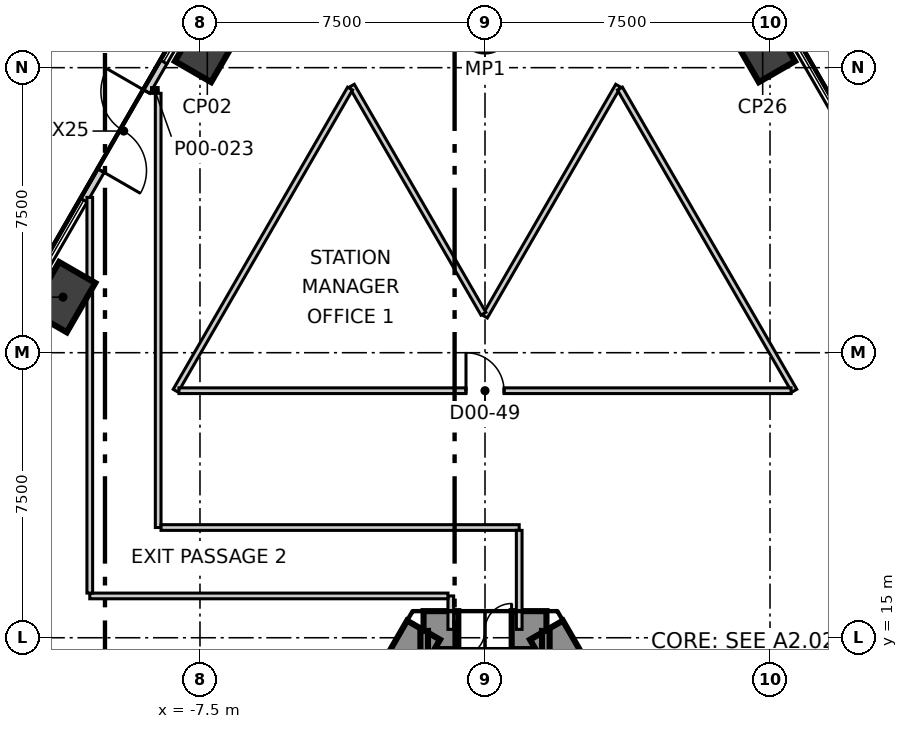
"""IFC4 building model, lengths in metres.
Left out: names, types, materials, properties, quantities, classifications, styles, units other than length and angle.
Written with IfcOpenShell. Run it as: python <this file> out.ifc"""

import sys

from ifc_helpers import new_model, si_unit, direction, frame, frame_2d, origin, origin_2d, place, context, subcontext, project, spatial, polyline, rectangle, outline, extrude, element, fill, save


model = new_model("IFC4")
c1 = context("Model", 3, precision=1e-05, world=origin(), true_north=direction((0.0, 1.0)))
c2 = subcontext(c1, "Body", "Model", "MODEL_VIEW")
j1 = project(units=[si_unit("LENGTHUNIT", "METRE"), si_unit("PLANEANGLEUNIT", "RADIAN")], contexts=[c1])
p1 = place(None, origin())
s1 = spatial("IfcSite", under=j1, at=p1, CompositionType="ELEMENT")
p2 = place(p1, origin())
s2 = spatial("IfcBuilding", under=s1, at=p2, CompositionType="ELEMENT")
p3 = place(p2, origin())
s3 = spatial("IfcBuildingStorey", under=s2, at=p3, CompositionType="ELEMENT", Elevation=0.0)
p4 = place(p3, frame((1.617, 15.2, -0.4), z_axis=(0.0, 0.0, 1.0), x_axis=(-1.0, 0.0, 0.0)))
e1 = element("IfcWall", 1, at=p4, inside=s3, PredefinedType="SHEAR", context=c2, shape_type="SweptSolid", body=[
    extrude(outline(polyline([(-0.288, -0.5), (1.617, -0.5), (3.522, -0.5), (2.945, 0.5), (1.617, 0.5), (0.289, 0.5), (-0.288, -0.5)])), origin(), (0.0, 0.0, 1.0), 8.5),
])
p5 = place(p4, frame((0.917, 0.0, 0.4)))
e2 = element("IfcOpeningElement", 2, at=p5, cuts=e1, PredefinedType="OPENING", context=c2, shape_type="SweptSolid", body=[
    extrude(rectangle(XDim=1.4, YDim=2.1, at=frame_2d((0.7, 1.05))), frame((0.0, 0.51, 0.0), z_axis=(0.0, -1.0, 0.0), x_axis=(1.0, 0.0, 0.0)), (0.0, 0.0, 1.0), 1.02),
])
p6 = place(p3, frame((-1.617, 15.2, -0.4), z_axis=(0.0, 0.0, 1.0), x_axis=(-0.499992141631, -0.866029940768, 0.0)))
e3 = element("IfcWall", 3, at=p6, inside=s3, PredefinedType="SHEAR", context=c2, shape_type="SweptSolid", body=[
    extrude(outline(polyline([(-0.289, -0.499), (1.656, -0.499), (3.601, -0.499), (5.547, -0.499), (7.492, -0.499), (9.437, -0.5), (11.382, -0.5), (13.328, -0.5), (15.273, -0.5), (17.218, -0.5), (19.163, -0.5), (21.109, -0.5), (23.054, -0.5), (24.999, -0.5), (24.422, 0.5), (22.566, 0.5), (20.709, 0.5), (18.853, 0.5), (16.997, 0.5), (15.14, 0.5), (13.284, 0.5), (11.427, 0.5), (9.571, 0.5), (7.715, 0.5), (5.858, 0.5), (4.002, 0.5), (2.146, 0.5), (0.289, 0.5), (-0.289, -0.499)])), origin(), (0.0, 0.0, 1.0), 8.5),
])
p7 = place(p6, frame((11.805, 0.0, 0.4)))
e4 = element("IfcOpeningElement", 4, at=p7, cuts=e3, PredefinedType="OPENING", context=c2, shape_type="SweptSolid", body=[
    extrude(rectangle(XDim=1.1, YDim=2.1, at=frame_2d((0.55, 1.05))), frame((0.0, 0.51, 0.0), z_axis=(0.0, -1.0, 0.0), x_axis=(1.0, 0.0, 0.0)), (0.0, 0.0, 1.0), 1.02),
])
p8 = place(p3, frame((13.972, -6.2, -0.4), z_axis=(0.0, 0.0, 1.0), x_axis=(-0.499992141631, 0.866029940768, 0.0)))
e5 = element("IfcWall", 5, at=p8, inside=s3, PredefinedType="SHEAR", context=c2, shape_type="SweptSolid", body=[
    extrude(outline(polyline([(-0.288, -0.5), (1.657, -0.5), (3.602, -0.5), (5.547, -0.5), (7.493, -0.5), (9.438, -0.5), (11.383, -0.5), (13.328, -0.5), (15.273, -0.5), (17.218, -0.499), (19.164, -0.499), (21.109, -0.499), (23.054, -0.499), (24.999, -0.499), (24.422, 0.5), (22.566, 0.5), (20.709, 0.5), (18.853, 0.5), (16.996, 0.5), (15.14, 0.5), (13.283, 0.5), (11.427, 0.5), (9.57, 0.5), (7.714, 0.5), (5.857, 0.5), (4.001, 0.5), (2.145, 0.5), (0.288, 0.5), (-0.288, -0.5)])), origin(), (0.0, 0.0, 1.0), 8.5),
])
p9 = place(p8, frame((11.455, 0.0, 0.4)))
e6 = element("IfcOpeningElement", 6, at=p9, cuts=e5, PredefinedType="OPENING", context=c2, shape_type="SweptSolid", body=[
    extrude(rectangle(XDim=1.8, YDim=2.1, at=frame_2d((0.9, 1.05))), frame((0.0, 0.51, 0.0), z_axis=(0.0, -1.0, 0.0), x_axis=(1.0, 0.0, 0.0)), (0.0, 0.0, 1.0), 1.02),
])
for number, where, z_axis, x_axis in (
    (7, (-7.307, 30.544, -0.4), (0.0, 0.0, 1.0), (0.5, 0.866, 0.0)),
    (8, (-11.106, 23.962, -0.4), (0.0, 0.0, 1.0), (0.5, 0.866, 0.0)),
    (9, (7.307, 30.544, -0.4), (0.0, 0.0, 1.0), (-0.5, 0.866, 0.0)),
):
    element("IfcColumn", number, at=place(p3, frame(where, z_axis=z_axis, x_axis=x_axis)), inside=s3, PredefinedType="COLUMN", context=c2, shape_type="SweptSolid", body=[
        extrude(rectangle(XDim=1.5, YDim=1.1, at=origin_2d()), origin(), (0.0, 0.0, 1.0), 8.5),
    ])
p10 = place(p3, frame((-8.457, 30.151, 0.0), z_axis=(0.0, 0.0, 1.0), x_axis=(-0.500009288593, -0.866020040946, 0.0)))
e10 = element("IfcWall", 10, at=p10, inside=s3, PredefinedType="ELEMENTEDWALL", context=c2, shape_type="SweptSolid", body=[
    extrude(rectangle(XDim=4.2, YDim=0.2, at=frame_2d((2.1, 0.0))), origin(), (0.0, 0.0, 1.0), 8.1),
])
p11 = place(p10, frame((0.9, 0.0, 0.0)))
e11 = element("IfcOpeningElement", 11, at=p11, cuts=e10, PredefinedType="OPENING", context=c2, shape_type="SweptSolid", body=[
    extrude(rectangle(XDim=2.4, YDim=3.2, at=frame_2d((1.2, 1.6))), frame((0.0, 0.11, 0.0), z_axis=(0.0, -1.0, 0.0), x_axis=(1.0, 0.0, 0.0)), (0.0, 0.0, 1.0), 0.22),
])
p12 = place(p3, frame((-0.9, 15.22, 0.0), z_axis=(0.0, 0.0, 1.0), x_axis=(0.0, 1.0, 0.0)))
e12 = element("IfcWall", 12, at=p12, inside=s3, PredefinedType="PARTITIONING", context=c2, shape_type="SweptSolid", body=[
    extrude(rectangle(XDim=0.88, YDim=0.15, at=frame_2d((0.44, 0.0))), origin(), (0.0, 0.0, 1.0), 8.1),
])
p13 = place(p3, frame((-10.4, 16.1, 0.0), z_axis=(0.0, 0.0, 1.0), x_axis=(1.0, 0.0, 0.0)))
e13 = element("IfcWall", 13, at=p13, inside=s3, PredefinedType="PARTITIONING", context=c2, shape_type="SweptSolid", body=[
    extrude(rectangle(XDim=9.425, YDim=0.15, at=frame_2d((4.712, 0.0))), origin(), (0.0, 0.0, 1.0), 8.1),
])
p14 = place(p3, frame((-10.4, 16.175, 0.0), z_axis=(0.0, 0.0, 1.0), x_axis=(0.0, 1.0, 0.0)))
e14 = element("IfcWall", 14, at=p14, inside=s3, PredefinedType="PARTITIONING", context=c2, shape_type="SweptSolid", body=[
    extrude(rectangle(XDim=10.411, YDim=0.15, at=frame_2d((5.206, 0.0))), origin(), (0.0, 0.0, 1.0), 8.1),
])
p15 = place(p3, frame((-8.775, 29.4, 0.0), z_axis=(0.0, 0.0, 1.0), x_axis=(1.0, 0.0, 0.0)))
e15 = element("IfcWall", 15, at=p15, inside=s3, PredefinedType="PARTITIONING", context=c2, shape_type="SweptSolid", body=[
    extrude(rectangle(XDim=0.175, YDim=0.15, at=frame_2d((0.087, 0.0))), origin(), (0.0, 0.0, 1.0), 8.1),
])
p16 = place(p3, frame((-8.6, 17.9, 0.0), z_axis=(0.0, 0.0, 1.0), x_axis=(0.0, 1.0, 0.0)))
e16 = element("IfcWall", 16, at=p16, inside=s3, PredefinedType="PARTITIONING", context=c2, shape_type="SweptSolid", body=[
    extrude(rectangle(XDim=11.425, YDim=0.15, at=frame_2d((5.712, 0.0))), origin(), (0.0, 0.0, 1.0), 8.1),
])
p17 = place(p3, frame((-8.525, 17.9, 0.0), z_axis=(0.0, 0.0, 1.0), x_axis=(1.0, 0.0, 0.0)))
e17 = element("IfcWall", 17, at=p17, inside=s3, PredefinedType="PARTITIONING", context=c2, shape_type="SweptSolid", body=[
    extrude(rectangle(XDim=9.425, YDim=0.15, at=frame_2d((4.712, 0.0))), origin(), (0.0, 0.0, 1.0), 8.1),
])
p18 = place(p3, frame((0.9, 15.22, 0.0), z_axis=(0.0, 0.0, 1.0), x_axis=(0.0, 1.0, 0.0)))
e18 = element("IfcWall", 18, at=p18, inside=s3, PredefinedType="PARTITIONING", context=c2, shape_type="SweptSolid", body=[
    extrude(rectangle(XDim=2.605, YDim=0.15, at=frame_2d((1.302, 0.0))), origin(), (0.0, 0.0, 1.0), 8.1),
])
p19 = place(p3, frame((-0.003, 23.451, 0.0), z_axis=(0.0, 0.0, 1.0), x_axis=(0.500046806923, 0.865998378108, 0.0)))
e19 = element("IfcWall", 19, at=p19, inside=s3, PredefinedType="PARTITIONING", context=c2, shape_type="SweptSolid", body=[
    extrude(rectangle(XDim=7.015, YDim=0.15, at=frame_2d((3.507, 0.0))), origin(), (0.0, 0.0, 1.0), 8.1),
])
p20 = place(p3, frame((3.551, 29.45, 0.0), z_axis=(0.0, 0.0, 1.0), x_axis=(0.499915084064, -0.866074424472, 0.0)))
e20 = element("IfcWall", 20, at=p20, inside=s3, PredefinedType="PARTITIONING", context=c2, shape_type="SweptSolid", body=[
    extrude(rectangle(XDim=9.179, YDim=0.15, at=frame_2d((4.59, 0.0))), origin(), (0.0, 0.0, 1.0), 8.1),
])
p21 = place(p3, frame((-3.505, 29.526, 0.0), z_axis=(0.0, 0.0, 1.0), x_axis=(0.49997462182, -0.866040055388, 0.0)))
e21 = element("IfcWall", 21, at=p21, inside=s3, PredefinedType="PARTITIONING", context=c2, shape_type="SweptSolid", body=[
    extrude(rectangle(XDim=6.928, YDim=0.15, at=frame_2d((3.464, 0.0))), origin(), (0.0, 0.0, 1.0), 8.1),
])
p22 = place(p3, frame((-8.14, 21.5, 0.0), z_axis=(0.0, 0.0, 1.0), x_axis=(0.499915084064, 0.866074424472, 0.0)))
e22 = element("IfcWall", 22, at=p22, inside=s3, PredefinedType="PARTITIONING", context=c2, shape_type="SweptSolid", body=[
    extrude(rectangle(XDim=9.179, YDim=0.15, at=frame_2d((4.59, 0.0))), origin(), (0.0, 0.0, 1.0), 8.1),
])
p23 = place(p3, frame((-8.054, 21.5, 0.0), z_axis=(0.0, 0.0, 1.0), x_axis=(1.0, 0.0, 0.0)))
e23 = element("IfcWall", 23, at=p23, inside=s3, PredefinedType="PARTITIONING", context=c2, shape_type="SweptSolid", body=[
    extrude(rectangle(XDim=16.108, YDim=0.15, at=frame_2d((8.054, 0.0))), origin(), (0.0, 0.0, 1.0), 8.1),
])
p24 = place(p23, frame((7.554, 0.0, 0.0)))
e24 = element("IfcOpeningElement", 24, at=p24, cuts=e23, PredefinedType="OPENING", context=c2, shape_type="SweptSolid", body=[
    extrude(rectangle(XDim=1.0, YDim=2.1, at=frame_2d((0.5, 1.05))), frame((0.0, 0.085, 0.0), z_axis=(0.0, -1.0, 0.0), x_axis=(1.0, 0.0, 0.0)), (0.0, 0.0, 1.0), 0.17),
])
for number, where, z_axis, x_axis in (
    (25, (1.6, 6.615, 0.0), (0.0, 0.0, 1.0), (0.0, 1.0, 0.0)),
    (26, (-1.6, 6.615, 0.0), (0.0, 0.0, 1.0), (0.0, 1.0, 0.0)),
):
    element("IfcWall", number, at=place(p3, frame(where, z_axis=z_axis, x_axis=x_axis)), inside=s3, PredefinedType="SOLIDWALL", context=c2, shape_type="SweptSolid", body=[
        extrude(rectangle(XDim=8.565, YDim=0.2, at=frame_2d((4.282, 0.0))), origin(), (0.0, 0.0, 1.0), 8.1),
    ])
p25 = place(p11, frame((2.4, 0.0, 0.0), z_axis=(0.0, 0.0, 1.0), x_axis=(-1.0, 0.0, 0.0)))
e27 = element("IfcDoor", 27, at=p25, inside=s3, OperationType="DOUBLE_DOOR_SINGLE_SWING", PredefinedType="DOOR", context=c2, shape_type="SweptSolid", body=[
    extrude(rectangle(XDim=2.4, YDim=3.2, at=frame_2d((1.2, 1.6))), frame((0.0, 0.025, 0.0), z_axis=(0.0, -1.0, 0.0), x_axis=(1.0, 0.0, 0.0)), (0.0, 0.0, 1.0), 0.05),
])
fill(e11, e27)
p26 = place(p24, origin())
e28 = element("IfcDoor", 28, at=p26, inside=s3, OperationType="SINGLE_SWING_RIGHT", PredefinedType="DOOR", context=c2, shape_type="SweptSolid", body=[
    extrude(rectangle(XDim=1.0, YDim=2.1, at=frame_2d((0.5, 1.05))), frame((0.0, 0.025, 0.0), z_axis=(0.0, -1.0, 0.0), x_axis=(1.0, 0.0, 0.0)), (0.0, 0.0, 1.0), 0.05),
])
fill(e24, e28)
p27 = place(p5, origin())
e29 = element("IfcDoor", 29, at=p27, inside=s3, OperationType="DOUBLE_DOOR_SINGLE_SWING", PredefinedType="DOOR", context=c2, shape_type="SweptSolid", body=[
    extrude(rectangle(XDim=1.4, YDim=2.1, at=frame_2d((0.7, 1.05))), frame((0.0, 0.025, 0.0), z_axis=(0.0, -1.0, 0.0), x_axis=(1.0, 0.0, 0.0)), (0.0, 0.0, 1.0), 0.05),
])
fill(e2, e29)
save(model, sys.argv[1])
